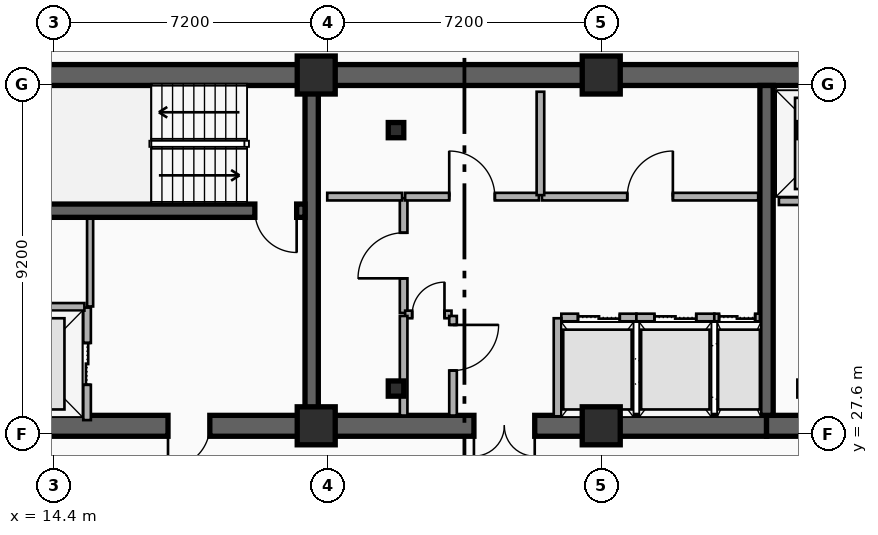
"""IFC4 building model, lengths in metres.
Left out: names, types, materials, properties, quantities, classifications, styles, units other than length and angle.
Written with IfcOpenShell. Run it as: python <this file> out.ifc"""

import sys

from ifc_helpers import new_model, si_unit, direction, frame, frame_2d, origin, origin_2d, place, context, subcontext, project, spatial, rectangle, i_section, extrude, element, fill, save


model = new_model("IFC4")
c1 = context("Model", 3, precision=1e-05, world=origin(), true_north=direction((0.0, 1.0)))
c2 = subcontext(c1, "Body", "Model", "MODEL_VIEW")
j1 = project(units=[si_unit("LENGTHUNIT", "METRE"), si_unit("PLANEANGLEUNIT", "RADIAN")], contexts=[c1])
p1 = place(None, origin())
s1 = spatial("IfcSite", under=j1, at=p1, CompositionType="ELEMENT")
p2 = place(p1, origin())
s2 = spatial("IfcBuilding", under=s1, at=p2, CompositionType="ELEMENT")
p3 = place(p2, frame((0.0, 0.0, 196.8)))
s3 = spatial("IfcBuildingStorey", under=s2, at=p3, CompositionType="ELEMENT", Elevation=196.8)
p4 = place(p3, frame((12.15, 37.05, 0.0), z_axis=(0.0, 0.0, 1.0), x_axis=(1.0, 0.0, 0.0)))
e1 = element("IfcWall", 1, at=p4, inside=s3, PredefinedType="SHEAR", context=c2, shape_type="SweptSolid", body=[
    extrude(rectangle(XDim=33.23, YDim=0.55, at=frame_2d((16.615, 0.0))), origin(), (0.0, 0.0, 1.0), 3.6),
])
p5 = place(p3, frame((21.18, 27.82, 0.0), z_axis=(0.0, 0.0, 1.0), x_axis=(-1.0, 0.0, 0.0)))
e2 = element("IfcWall", 2, at=p5, inside=s3, PredefinedType="SHEAR", context=c2, shape_type="SweptSolid", body=[
    extrude(rectangle(XDim=9.03, YDim=0.55, at=frame_2d((4.515, 0.0))), origin(), (0.0, 0.0, 1.0), 3.6),
])
p6 = place(p5, frame((2.68, 0.0, 0.0)))
e3 = element("IfcOpeningElement", 3, at=p6, cuts=e2, PredefinedType="OPENING", context=c2, shape_type="SweptSolid", body=[
    extrude(rectangle(XDim=1.1, YDim=2.15, at=frame_2d((0.55, 1.075))), frame((0.0, 0.285, 0.0), z_axis=(0.0, -1.0, 0.0), x_axis=(1.0, 0.0, 0.0)), (0.0, 0.0, 1.0), 0.57),
])
p7 = place(p3, frame((33.15, 27.82, 0.0), z_axis=(0.0, 0.0, 1.0), x_axis=(-1.0, 0.0, 0.0)))
e4 = element("IfcWall", 4, at=p7, inside=s3, PredefinedType="SHEAR", context=c2, shape_type="SweptSolid", body=[
    extrude(rectangle(XDim=11.97, YDim=0.55, at=frame_2d((5.985, 0.0))), origin(), (0.0, 0.0, 1.0), 3.6),
])
p8 = place(p7, frame((6.1, 0.0, 0.0)))
e5 = element("IfcOpeningElement", 5, at=p8, cuts=e4, PredefinedType="OPENING", context=c2, shape_type="SweptSolid", body=[
    extrude(rectangle(XDim=1.6, YDim=2.2, at=frame_2d((0.8, 1.1))), frame((0.0, 0.285, 0.0), z_axis=(0.0, -1.0, 0.0), x_axis=(1.0, 0.0, 0.0)), (0.0, 0.0, 1.0), 0.57),
])
p9 = place(p3, frame((45.38, 27.82, 0.0), z_axis=(0.0, 0.0, 1.0), x_axis=(-1.0, 0.0, 0.0)))
e6 = element("IfcWall", 6, at=p9, inside=s3, PredefinedType="SHEAR", context=c2, shape_type="SweptSolid", body=[
    extrude(rectangle(XDim=12.23, YDim=0.55, at=frame_2d((6.115, 0.0))), origin(), (0.0, 0.0, 1.0), 3.6),
])
p10 = place(p9, frame((9.93, 0.0, 0.0)))
e7 = element("IfcOpeningElement", 7, at=p10, cuts=e6, PredefinedType="OPENING", context=c2, shape_type="SweptSolid", body=[
    extrude(rectangle(XDim=1.1, YDim=2.15, at=frame_2d((0.55, 1.075))), frame((0.0, 0.285, 0.0), z_axis=(0.0, -1.0, 0.0), x_axis=(1.0, 0.0, 0.0)), (0.0, 0.0, 1.0), 0.57),
])
p11 = place(p9, frame((6.23, 0.0, 0.0)))
e8 = element("IfcOpeningElement", 8, at=p11, cuts=e6, PredefinedType="OPENING", context=c2, shape_type="SweptSolid", body=[
    extrude(rectangle(XDim=1.1, YDim=2.15, at=frame_2d((0.55, 1.075))), frame((0.0, 0.285, 0.0), z_axis=(0.0, -1.0, 0.0), x_axis=(1.0, 0.0, 0.0)), (0.0, 0.0, 1.0), 0.57),
])
for number, where, z_axis, x_axis in (
    (9, (21.18, 28.095, 0.0), (0.0, 0.0, 1.0), (0.0, 1.0, 0.0)),
    (10, (33.15, 28.095, 0.0), (0.0, 0.0, 1.0), (0.0, 1.0, 0.0)),
):
    element("IfcWall", number, at=place(p3, frame(where, z_axis=z_axis, x_axis=x_axis)), inside=s3, PredefinedType="SHEAR", context=c2, shape_type="SweptSolid", body=[
        extrude(rectangle(XDim=8.68, YDim=0.35, at=frame_2d((4.34, 0.0))), origin(), (0.0, 0.0, 1.0), 3.6),
    ])
p12 = place(p3, frame((21.005, 33.48, 0.0), z_axis=(0.0, 0.0, 1.0), x_axis=(-1.0, 0.0, 0.0)))
e11 = element("IfcWall", 11, at=p12, inside=s3, PredefinedType="SHEAR", context=c2, shape_type="SweptSolid", body=[
    extrude(rectangle(XDim=8.58, YDim=0.35, at=frame_2d((4.29, 0.0))), origin(), (0.0, 0.0, 1.0), 3.6),
])
p13 = place(p12, frame((0.22, 0.0, 0.0)))
e12 = element("IfcOpeningElement", 12, at=p13, cuts=e11, PredefinedType="OPENING", context=c2, shape_type="SweptSolid", body=[
    extrude(rectangle(XDim=1.1, YDim=2.15, at=frame_2d((0.55, 1.075))), frame((0.0, 0.185, 0.0), z_axis=(0.0, -1.0, 0.0), x_axis=(1.0, 0.0, 0.0)), (0.0, 0.0, 1.0), 0.37),
])
for number, where, z_axis, x_axis in (
    (13, (23.4, 28.8, 0.0), (0.0, 0.0, 1.0), (1.0, 0.0, 0.0)),
    (14, (23.4, 35.6, 0.0), (0.0, 0.0, 1.0), (1.0, 0.0, 0.0)),
):
    element("IfcColumn", number, at=place(p3, frame(where, z_axis=z_axis, x_axis=x_axis)), inside=s3, PredefinedType="COLUMN", context=c2, shape_type="SweptSolid", body=[
        extrude(i_section(OverallWidth=0.408, OverallDepth=0.4, WebThickness=0.025, FlangeThickness=0.039, FilletRadius=0.015, at=origin_2d()), origin(), (0.0, 0.0, 1.0), 3.6),
    ])
for number, where, z_axis, x_axis in (
    (15, (21.3, 27.82, 0.0), (0.0, 0.0, 1.0), (1.0, 0.0, 0.0)),
    (16, (21.3, 37.05, 0.0), (0.0, 0.0, 1.0), (1.0, 0.0, 0.0)),
    (17, (28.8, 27.82, 0.0), (0.0, 0.0, 1.0), (1.0, 0.0, 0.0)),
    (18, (28.8, 37.05, 0.0), (0.0, 0.0, 1.0), (1.0, 0.0, 0.0)),
):
    element("IfcColumn", number, at=place(p3, frame(where, z_axis=z_axis, x_axis=x_axis)), inside=s3, PredefinedType="COLUMN", context=c2, shape_type="SweptSolid", body=[
        extrude(rectangle(XDim=1.0, YDim=1.0, at=origin_2d()), origin(), (0.0, 0.0, 1.0), 3.6),
    ])
p14 = place(p3, frame((15.27, 27.97, 0.0), z_axis=(0.0, 0.0, 1.0), x_axis=(0.0, 1.0, 0.0)))
e19 = element("IfcWall", 19, at=p14, inside=s3, PredefinedType="PARTITIONING", context=c2, shape_type="SweptSolid", body=[
    extrude(rectangle(XDim=2.96, YDim=0.2, at=frame_2d((1.48, 0.0))), origin(), (0.0, 0.0, 1.0), 2.41),
])
p15 = place(p14, frame((0.93, 0.0, 0.0)))
e20 = element("IfcOpeningElement", 20, at=p15, cuts=e19, PredefinedType="OPENING", context=c2, shape_type="SweptSolid", body=[
    extrude(rectangle(XDim=1.1, YDim=2.15, at=frame_2d((0.55, 1.075))), frame((0.0, 0.11, 0.0), z_axis=(0.0, -1.0, 0.0), x_axis=(1.0, 0.0, 0.0)), (0.0, 0.0, 1.0), 0.22),
])
p16 = place(p3, frame((12.45, 30.95, 0.0), z_axis=(0.0, 0.0, 1.0), x_axis=(1.0, 0.0, 0.0)))
e21 = element("IfcWall", 21, at=p16, inside=s3, PredefinedType="PARTITIONING", context=c2, shape_type="SweptSolid", body=[
    extrude(rectangle(XDim=2.75, YDim=0.2, at=frame_2d((1.375, 0.0))), origin(), (0.0, 0.0, 1.0), 2.41),
])
p17 = place(p3, frame((33.475, 33.73, 0.0), z_axis=(0.0, 0.0, 1.0), x_axis=(1.0, 0.0, 0.0)))
e22 = element("IfcWall", 22, at=p17, inside=s3, PredefinedType="PARTITIONING", context=c2, shape_type="SweptSolid", body=[
    extrude(rectangle(XDim=2.725, YDim=0.2, at=frame_2d((1.362, 0.0))), origin(), (0.0, 0.0, 1.0), 2.41),
])
p18 = place(p17, frame((0.812, 0.0, 0.0)))
e23 = element("IfcOpeningElement", 23, at=p18, cuts=e22, PredefinedType="OPENING", context=c2, shape_type="SweptSolid", body=[
    extrude(rectangle(XDim=1.1, YDim=2.15, at=frame_2d((0.55, 1.075))), frame((0.0, 0.11, 0.0), z_axis=(0.0, -1.0, 0.0), x_axis=(1.0, 0.0, 0.0)), (0.0, 0.0, 1.0), 0.22),
])
p19 = place(p3, frame((27.75, 30.67, 0.0), z_axis=(0.0, 0.0, 1.0), x_axis=(1.0, 0.0, 0.0)))
e24 = element("IfcWall", 24, at=p19, inside=s3, PredefinedType="PARTITIONING", context=c2, shape_type="SweptSolid", body=[
    extrude(rectangle(XDim=1.975, YDim=0.2, at=frame_2d((0.988, 0.0))), origin(), (0.0, 0.0, 1.0), 2.41),
])
p20 = place(p19, frame((0.438, 0.0, 0.0)))
e25 = element("IfcOpeningElement", 25, at=p20, cuts=e24, PredefinedType="OPENING", context=c2, shape_type="SweptSolid", body=[
    extrude(rectangle(XDim=1.1, YDim=2.15, at=frame_2d((0.55, 1.075))), frame((0.0, 0.11, 0.0), z_axis=(0.0, -1.0, 0.0), x_axis=(1.0, 0.0, 0.0)), (0.0, 0.0, 1.0), 0.22),
])
p21 = place(p3, frame((27.65, 28.07, 0.0), z_axis=(0.0, 0.0, 1.0), x_axis=(0.0, 1.0, 0.0)))
e26 = element("IfcWall", 26, at=p21, inside=s3, PredefinedType="PARTITIONING", context=c2, shape_type="SweptSolid", body=[
    extrude(rectangle(XDim=2.58, YDim=0.2, at=frame_2d((1.29, 0.0))), origin(), (0.0, 0.0, 1.0), 2.41),
])
p22 = place(p3, frame((29.725, 30.67, 0.0), z_axis=(0.0, 0.0, 1.0), x_axis=(1.0, 0.0, 0.0)))
e27 = element("IfcWall", 27, at=p22, inside=s3, PredefinedType="PARTITIONING", context=c2, shape_type="SweptSolid", body=[
    extrude(rectangle(XDim=2.05, YDim=0.2, at=frame_2d((1.025, 0.0))), origin(), (0.0, 0.0, 1.0), 2.72),
])
p23 = place(p22, frame((0.475, 0.0, 0.0)))
e28 = element("IfcOpeningElement", 28, at=p23, cuts=e27, PredefinedType="OPENING", context=c2, shape_type="SweptSolid", body=[
    extrude(rectangle(XDim=1.1, YDim=2.15, at=frame_2d((0.55, 1.075))), frame((0.0, 0.11, 0.0), z_axis=(0.0, -1.0, 0.0), x_axis=(1.0, 0.0, 0.0)), (0.0, 0.0, 1.0), 0.22),
])
p24 = place(p3, frame((31.775, 30.67, 0.0), z_axis=(0.0, 0.0, 1.0), x_axis=(1.0, 0.0, 0.0)))
e29 = element("IfcWall", 29, at=p24, inside=s3, PredefinedType="PARTITIONING", context=c2, shape_type="SweptSolid", body=[
    extrude(rectangle(XDim=1.2, YDim=0.2, at=frame_2d((0.6, 0.0))), origin(), (0.0, 0.0, 1.0), 2.72),
])
p25 = place(p24, frame((0.125, 0.0, 0.0)))
e30 = element("IfcOpeningElement", 30, at=p25, cuts=e29, PredefinedType="OPENING", context=c2, shape_type="SweptSolid", body=[
    extrude(rectangle(XDim=0.95, YDim=2.15, at=frame_2d((0.475, 1.075))), frame((0.0, 0.11, 0.0), z_axis=(0.0, -1.0, 0.0), x_axis=(1.0, 0.0, 0.0)), (0.0, 0.0, 1.0), 0.22),
])
p26 = place(p3, frame((23.6, 30.79, 0.0), z_axis=(0.0, 0.0, 1.0), x_axis=(0.0, 1.0, 0.0)))
e31 = element("IfcWall", 31, at=p26, inside=s3, PredefinedType="PARTITIONING", context=c2, shape_type="SweptSolid", body=[
    extrude(rectangle(XDim=3.02, YDim=0.2, at=frame_2d((1.51, 0.0))), origin(), (0.0, 0.0, 1.0), 3.34),
])
p27 = place(p26, frame((0.91, 0.0, 0.0)))
e32 = element("IfcOpeningElement", 32, at=p27, cuts=e31, PredefinedType="OPENING", context=c2, shape_type="SweptSolid", body=[
    extrude(rectangle(XDim=1.2, YDim=2.15, at=frame_2d((0.6, 1.075))), frame((0.0, 0.11, 0.0), z_axis=(0.0, -1.0, 0.0), x_axis=(1.0, 0.0, 0.0)), (0.0, 0.0, 1.0), 0.22),
])
p28 = place(p3, frame((23.64, 30.75, 0.0), z_axis=(0.0, 0.0, 1.0), x_axis=(1.0, 0.0, 0.0)))
e33 = element("IfcWall", 33, at=p28, inside=s3, PredefinedType="PARTITIONING", context=c2, shape_type="SweptSolid", body=[
    extrude(rectangle(XDim=1.22, YDim=0.2, at=frame_2d((0.61, 0.0))), origin(), (0.0, 0.0, 1.0), 3.34),
])
p29 = place(p28, frame((0.185, 0.0, 0.0)))
e34 = element("IfcOpeningElement", 34, at=p29, cuts=e33, PredefinedType="OPENING", context=c2, shape_type="SweptSolid", body=[
    extrude(rectangle(XDim=0.85, YDim=2.1, at=frame_2d((0.425, 1.05))), frame((0.0, 0.11, 0.0), z_axis=(0.0, -1.0, 0.0), x_axis=(1.0, 0.0, 0.0)), (0.0, 0.0, 1.0), 0.22),
])
p30 = place(p3, frame((23.64, 33.85, 0.0), z_axis=(0.0, 0.0, 1.0), x_axis=(1.0, 0.0, 0.0)))
e35 = element("IfcWall", 35, at=p30, inside=s3, PredefinedType="PARTITIONING", context=c2, shape_type="SweptSolid", body=[
    extrude(rectangle(XDim=3.52, YDim=0.2, at=frame_2d((1.76, 0.0))), origin(), (0.0, 0.0, 1.0), 3.34),
])
p31 = place(p30, frame((1.16, 0.0, 0.0)))
e36 = element("IfcOpeningElement", 36, at=p31, cuts=e35, PredefinedType="OPENING", context=c2, shape_type="SweptSolid", body=[
    extrude(rectangle(XDim=1.2, YDim=2.15, at=frame_2d((0.6, 1.075))), frame((0.0, 0.11, 0.0), z_axis=(0.0, -1.0, 0.0), x_axis=(1.0, 0.0, 0.0)), (0.0, 0.0, 1.0), 0.22),
])
p32 = place(p3, frame((27.24, 33.85, 0.0), z_axis=(0.0, 0.0, 1.0), x_axis=(1.0, 0.0, 0.0)))
e37 = element("IfcWall", 37, at=p32, inside=s3, PredefinedType="PARTITIONING", context=c2, shape_type="SweptSolid", body=[
    extrude(rectangle(XDim=5.69, YDim=0.2, at=frame_2d((2.845, 0.0))), origin(), (0.0, 0.0, 1.0), 2.41),
])
p33 = place(p32, frame((2.245, 0.0, 0.0)))
e38 = element("IfcOpeningElement", 38, at=p33, cuts=e37, PredefinedType="OPENING", context=c2, shape_type="SweptSolid", body=[
    extrude(rectangle(XDim=1.2, YDim=2.15, at=frame_2d((0.6, 1.075))), frame((0.0, 0.11, 0.0), z_axis=(0.0, -1.0, 0.0), x_axis=(1.0, 0.0, 0.0)), (0.0, 0.0, 1.0), 0.22),
])
p34 = place(p3, frame((24.9, 30.71, 0.0), z_axis=(0.0, 0.0, 1.0), x_axis=(0.0, -1.0, 0.0)))
e39 = element("IfcWall", 39, at=p34, inside=s3, PredefinedType="PARTITIONING", context=c2, shape_type="SweptSolid", body=[
    extrude(rectangle(XDim=2.62, YDim=0.2, at=frame_2d((1.31, 0.0))), origin(), (0.0, 0.0, 1.0), 2.72),
])
p35 = place(p34, frame((0.235, 0.0, 0.0)))
e40 = element("IfcOpeningElement", 40, at=p35, cuts=e39, PredefinedType="OPENING", context=c2, shape_type="SweptSolid", body=[
    extrude(rectangle(XDim=1.2, YDim=2.15, at=frame_2d((0.6, 1.075))), frame((0.0, 0.11, 0.0), z_axis=(0.0, -1.0, 0.0), x_axis=(1.0, 0.0, 0.0)), (0.0, 0.0, 1.0), 0.22),
])
p36 = place(p3, frame((23.6, 28.09, 0.0), z_axis=(0.0, 0.0, 1.0), x_axis=(0.0, 1.0, 0.0)))
e41 = element("IfcWall", 41, at=p36, inside=s3, PredefinedType="PARTITIONING", context=c2, shape_type="SweptSolid", body=[
    extrude(rectangle(XDim=2.62, YDim=0.2, at=frame_2d((1.31, 0.0))), origin(), (0.0, 0.0, 1.0), 2.72),
])
p37 = place(p3, frame((21.59, 33.85, 0.0), z_axis=(0.0, 0.0, 1.0), x_axis=(1.0, 0.0, 0.0)))
e42 = element("IfcWall", 42, at=p37, inside=s3, PredefinedType="PARTITIONING", context=c2, shape_type="SweptSolid", body=[
    extrude(rectangle(XDim=1.97, YDim=0.2, at=frame_2d((0.985, 0.0))), origin(), (0.0, 0.0, 1.0), 2.41),
])
p38 = place(p3, frame((27.2, 33.89, 0.0), z_axis=(0.0, 0.0, 1.0), x_axis=(0.0, 1.0, 0.0)))
e43 = element("IfcWall", 43, at=p38, inside=s3, PredefinedType="PARTITIONING", context=c2, shape_type="SweptSolid", body=[
    extrude(rectangle(XDim=2.72, YDim=0.2, at=frame_2d((1.36, 0.0))), origin(), (0.0, 0.0, 1.0), 3.34),
])
p39 = place(p3, frame((15.35, 30.96, 0.0), z_axis=(0.0, 0.0, 1.0), x_axis=(0.0, 1.0, 0.0)))
e44 = element("IfcWall", 44, at=p39, inside=s3, PredefinedType="PARTITIONING", context=c2, shape_type="SweptSolid", body=[
    extrude(rectangle(XDim=2.31, YDim=0.16, at=frame_2d((1.155, 0.0))), origin(), (0.0, 0.0, 1.0), 3.34),
])
p40 = place(p15, origin())
e45 = element("IfcDoor", 45, at=p40, inside=s3, OperationType="DOUBLE_DOOR_SLIDING", PredefinedType="DOOR", context=c2, shape_type="SweptSolid", body=[
    extrude(rectangle(XDim=1.1, YDim=2.15, at=frame_2d((0.55, 1.075))), frame((0.0, 0.025, 0.0), z_axis=(0.0, -1.0, 0.0), x_axis=(1.0, 0.0, 0.0)), (0.0, 0.0, 1.0), 0.05),
])
fill(e20, e45)
p41 = place(p20, origin())
e46 = element("IfcDoor", 46, at=p41, inside=s3, OperationType="DOUBLE_DOOR_SLIDING", PredefinedType="DOOR", context=c2, shape_type="SweptSolid", body=[
    extrude(rectangle(XDim=1.1, YDim=2.15, at=frame_2d((0.55, 1.075))), frame((0.0, 0.025, 0.0), z_axis=(0.0, -1.0, 0.0), x_axis=(1.0, 0.0, 0.0)), (0.0, 0.0, 1.0), 0.05),
])
fill(e25, e46)
p42 = place(p23, origin())
e47 = element("IfcDoor", 47, at=p42, inside=s3, OperationType="DOUBLE_DOOR_SLIDING", PredefinedType="DOOR", context=c2, shape_type="SweptSolid", body=[
    extrude(rectangle(XDim=1.1, YDim=2.15, at=frame_2d((0.55, 1.075))), frame((0.0, 0.025, 0.0), z_axis=(0.0, -1.0, 0.0), x_axis=(1.0, 0.0, 0.0)), (0.0, 0.0, 1.0), 0.05),
])
fill(e28, e47)
p43 = place(p25, origin())
e48 = element("IfcDoor", 48, at=p43, inside=s3, OperationType="DOUBLE_DOOR_SLIDING", PredefinedType="DOOR", context=c2, shape_type="SweptSolid", body=[
    extrude(rectangle(XDim=0.95, YDim=2.15, at=frame_2d((0.475, 1.075))), frame((0.0, 0.025, 0.0), z_axis=(0.0, -1.0, 0.0), x_axis=(1.0, 0.0, 0.0)), (0.0, 0.0, 1.0), 0.05),
])
fill(e30, e48)
p44 = place(p13, origin())
e49 = element("IfcDoor", 49, at=p44, inside=s3, OperationType="SINGLE_SWING_LEFT", PredefinedType="DOOR", context=c2, shape_type="SweptSolid", body=[
    extrude(rectangle(XDim=1.1, YDim=2.15, at=frame_2d((0.55, 1.075))), frame((0.0, 0.025, 0.0), z_axis=(0.0, -1.0, 0.0), x_axis=(1.0, 0.0, 0.0)), (0.0, 0.0, 1.0), 0.05),
])
fill(e12, e49)
p45 = place(p6, origin())
e50 = element("IfcDoor", 50, at=p45, inside=s3, OperationType="SINGLE_SWING_RIGHT", PredefinedType="DOOR", context=c2, shape_type="SweptSolid", body=[
    extrude(rectangle(XDim=1.1, YDim=2.15, at=frame_2d((0.55, 1.075))), frame((0.0, 0.025, 0.0), z_axis=(0.0, -1.0, 0.0), x_axis=(1.0, 0.0, 0.0)), (0.0, 0.0, 1.0), 0.05),
])
fill(e3, e50)
p46 = place(p8, origin())
e51 = element("IfcDoor", 51, at=p46, inside=s3, OperationType="SINGLE_SWING_LEFT", PredefinedType="DOOR", context=c2, shape_type="SweptSolid", body=[
    extrude(rectangle(XDim=1.6, YDim=2.2, at=frame_2d((0.8, 1.1))), frame((0.0, 0.025, 0.0), z_axis=(0.0, -1.0, 0.0), x_axis=(1.0, 0.0, 0.0)), (0.0, 0.0, 1.0), 0.05),
])
fill(e5, e51)
p47 = place(p27, origin())
e52 = element("IfcDoor", 52, at=p47, inside=s3, OperationType="SINGLE_SWING_LEFT", PredefinedType="DOOR", context=c2, shape_type="SweptSolid", body=[
    extrude(rectangle(XDim=1.2, YDim=2.15, at=frame_2d((0.6, 1.075))), frame((0.0, 0.025, 0.0), z_axis=(0.0, -1.0, 0.0), x_axis=(1.0, 0.0, 0.0)), (0.0, 0.0, 1.0), 0.05),
])
fill(e32, e52)
p48 = place(p29, origin())
e53 = element("IfcDoor", 53, at=p48, inside=s3, OperationType="SINGLE_SWING_RIGHT", PredefinedType="DOOR", context=c2, shape_type="SweptSolid", body=[
    extrude(rectangle(XDim=0.85, YDim=2.1, at=frame_2d((0.425, 1.05))), frame((0.0, 0.025, 0.0), z_axis=(0.0, -1.0, 0.0), x_axis=(1.0, 0.0, 0.0)), (0.0, 0.0, 1.0), 0.05),
])
fill(e34, e53)
p49 = place(p31, origin())
e54 = element("IfcDoor", 54, at=p49, inside=s3, OperationType="SINGLE_SWING_LEFT", PredefinedType="DOOR", context=c2, shape_type="SweptSolid", body=[
    extrude(rectangle(XDim=1.2, YDim=2.15, at=frame_2d((0.6, 1.075))), frame((0.0, 0.025, 0.0), z_axis=(0.0, -1.0, 0.0), x_axis=(1.0, 0.0, 0.0)), (0.0, 0.0, 1.0), 0.05),
])
fill(e36, e54)
p50 = place(p33, origin())
e55 = element("IfcDoor", 55, at=p50, inside=s3, OperationType="SINGLE_SWING_RIGHT", PredefinedType="DOOR", context=c2, shape_type="SweptSolid", body=[
    extrude(rectangle(XDim=1.2, YDim=2.15, at=frame_2d((0.6, 1.075))), frame((0.0, 0.025, 0.0), z_axis=(0.0, -1.0, 0.0), x_axis=(1.0, 0.0, 0.0)), (0.0, 0.0, 1.0), 0.05),
])
fill(e38, e55)
p51 = place(p35, origin())
e56 = element("IfcDoor", 56, at=p51, inside=s3, OperationType="SINGLE_SWING_LEFT", PredefinedType="DOOR", context=c2, shape_type="SweptSolid", body=[
    extrude(rectangle(XDim=1.2, YDim=2.15, at=frame_2d((0.6, 1.075))), frame((0.0, 0.025, 0.0), z_axis=(0.0, -1.0, 0.0), x_axis=(1.0, 0.0, 0.0)), (0.0, 0.0, 1.0), 0.05),
])
fill(e40, e56)
save(model, sys.argv[1])
